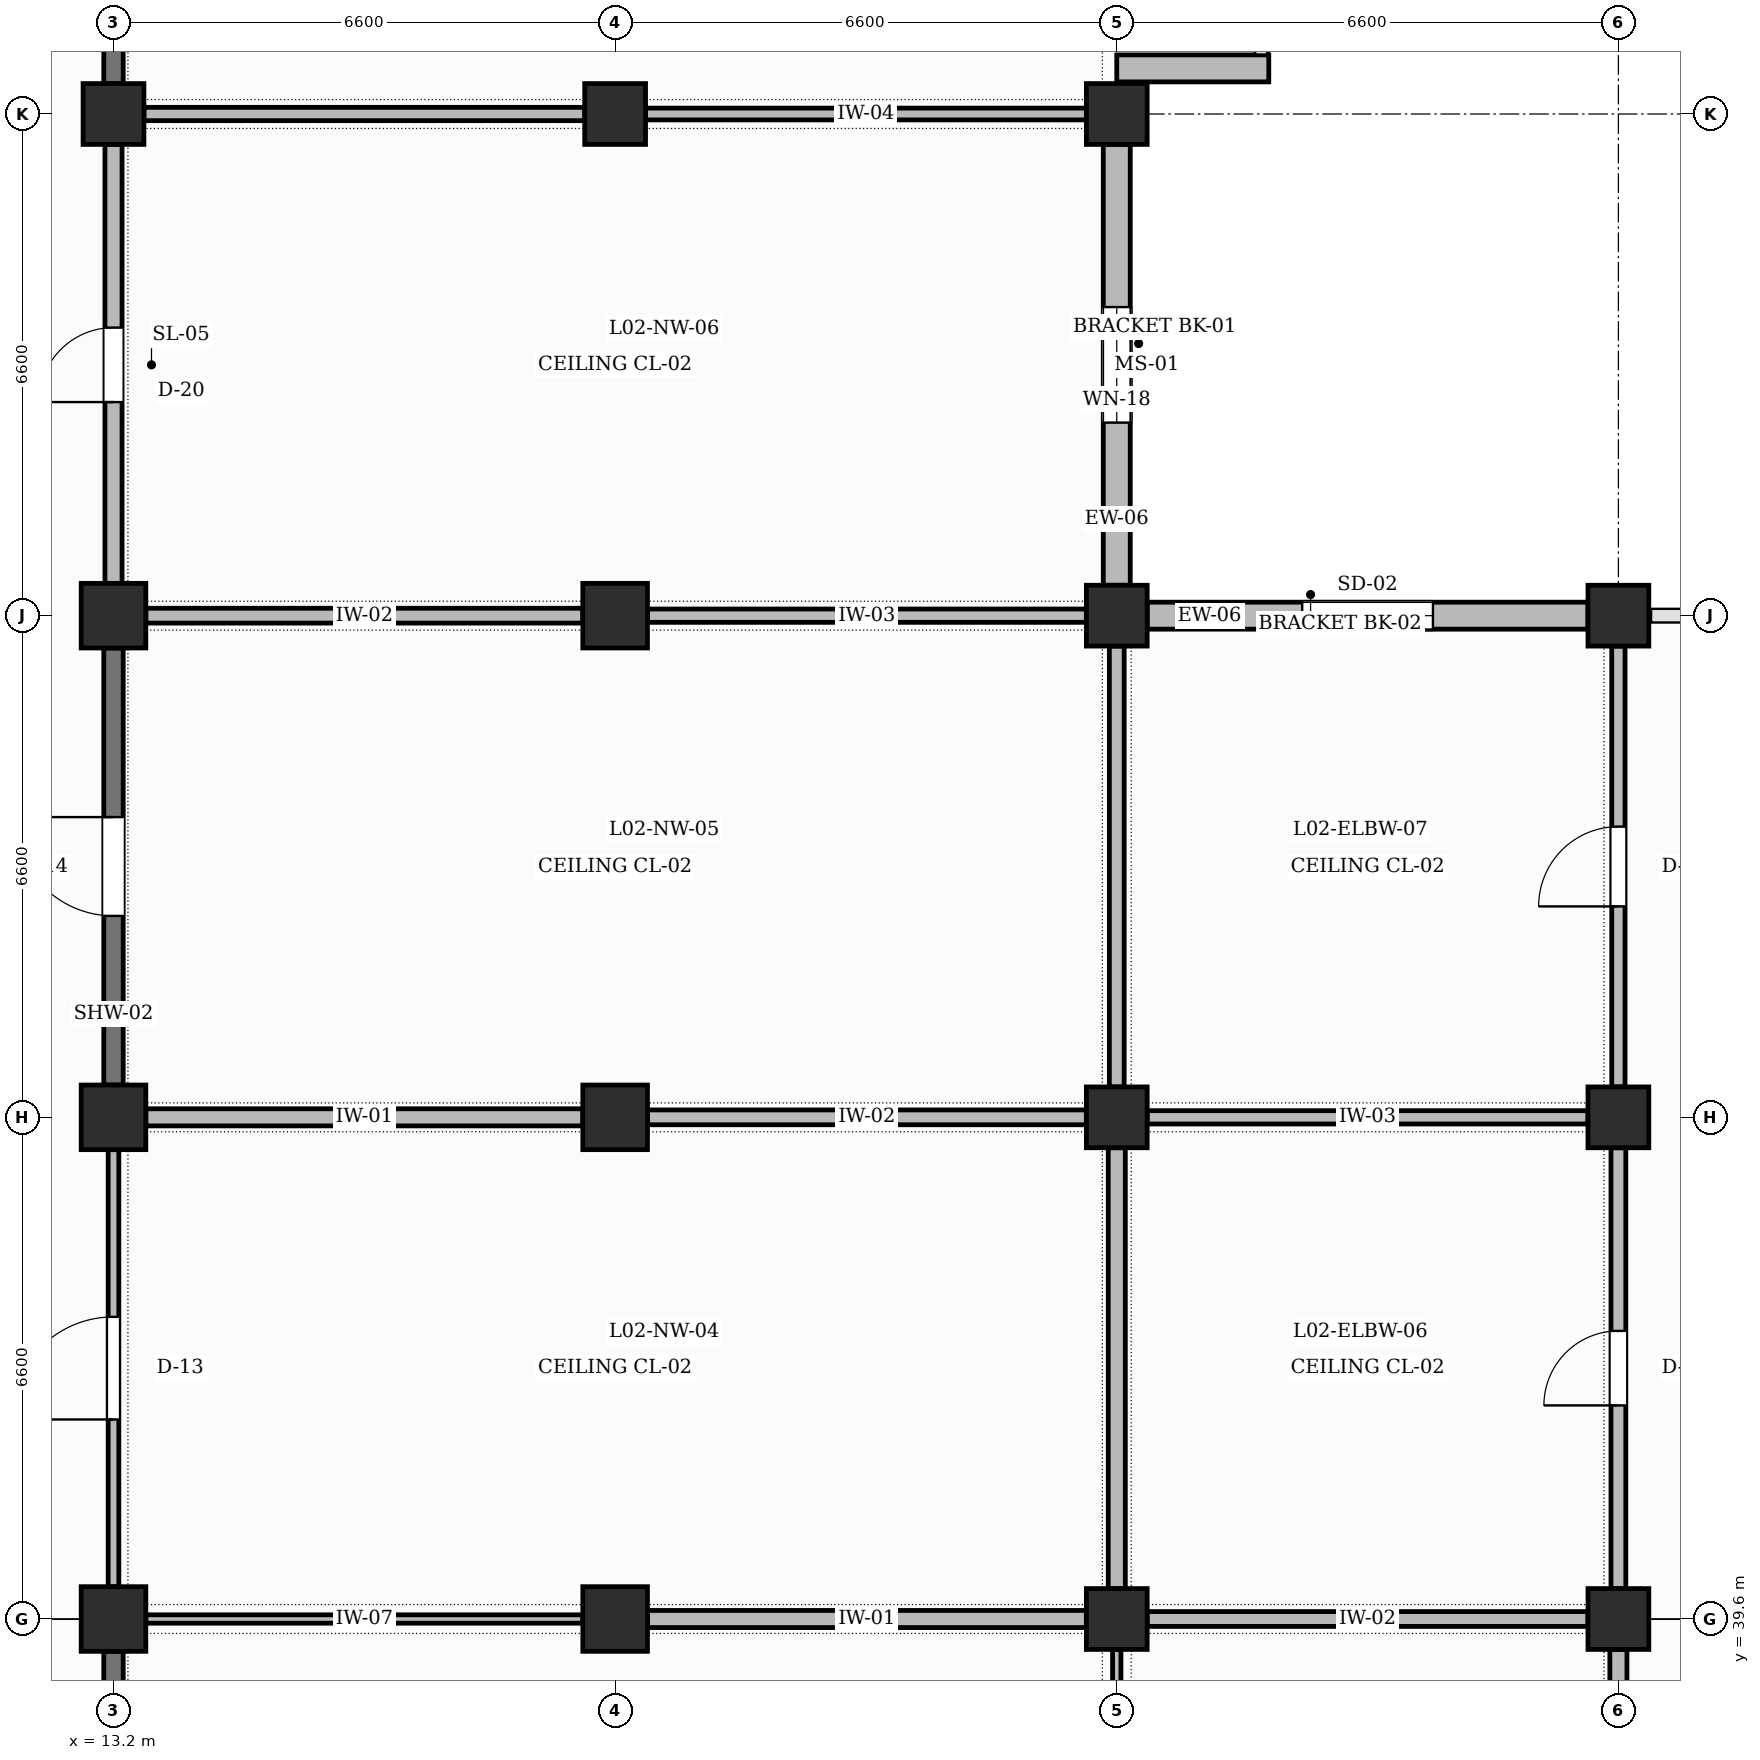
"""IFC4 building model, lengths in metres.
Left out: names, types, materials, properties, quantities, classifications, styles, units other than length and angle.
Written with IfcOpenShell. Run it as: python <this file> out.ifc"""

import sys

from ifc_helpers import new_model, si_unit, direction, frame, frame_2d, origin, origin_2d, place, context, subcontext, project, spatial, rectangle, extrude, element, fill, save


model = new_model("IFC4")
c1 = context("Model", 3, precision=1e-05, world=origin(), true_north=direction((0.0, 1.0)))
c2 = subcontext(c1, "Body", "Model", "MODEL_VIEW")
j1 = project(units=[si_unit("LENGTHUNIT", "METRE"), si_unit("PLANEANGLEUNIT", "RADIAN")], contexts=[c1])
p1 = place(None, origin())
s1 = spatial("IfcSite", under=j1, at=p1, CompositionType="ELEMENT")
p2 = place(p1, origin())
s2 = spatial("IfcBuilding", under=s1, at=p2, CompositionType="ELEMENT")
p3 = place(p2, frame((0.0, 0.0, 10.2)))
s3 = spatial("IfcBuildingStorey", under=s2, at=p3, CompositionType="ELEMENT", Elevation=10.2)
for number, where, z_axis, x_axis in (
    (1, (13.2, 39.6, 0.0), (0.0, 0.0, 1.0), (1.0, 0.0, 0.0)),
    (2, (13.2, 46.2, 0.0), (0.0, 0.0, 1.0), (1.0, 0.0, 0.0)),
    (3, (13.2, 52.8, 0.0), (0.0, 0.0, 1.0), (1.0, 0.0, 0.0)),
):
    element("IfcColumn", number, at=place(p3, frame(where, z_axis=z_axis, x_axis=x_axis)), inside=s3, PredefinedType="COLUMN", context=c2, shape_type="SweptSolid", body=[
        extrude(rectangle(XDim=0.85, YDim=0.85, at=origin_2d()), origin(), (0.0, 0.0, 1.0), 4.2),
    ])
p4 = place(p3, frame((13.2, 59.4, 0.0), z_axis=(0.0, 0.0, 1.0), x_axis=(1.0, 0.0, 0.0)))
e4 = element("IfcColumn", 4, at=p4, inside=s3, PredefinedType="COLUMN", context=c2, shape_type="SweptSolid", body=[
    extrude(rectangle(XDim=0.8, YDim=0.8, at=origin_2d()), origin(), (0.0, 0.0, 1.0), 4.2),
])
for number, where, z_axis, x_axis in (
    (5, (19.8, 39.6, 0.0), (0.0, 0.0, 1.0), (1.0, 0.0, 0.0)),
    (6, (19.8, 46.2, 0.0), (0.0, 0.0, 1.0), (1.0, 0.0, 0.0)),
    (7, (19.8, 52.8, 0.0), (0.0, 0.0, 1.0), (1.0, 0.0, 0.0)),
):
    element("IfcColumn", number, at=place(p3, frame(where, z_axis=z_axis, x_axis=x_axis)), inside=s3, PredefinedType="COLUMN", context=c2, shape_type="SweptSolid", body=[
        extrude(rectangle(XDim=0.85, YDim=0.85, at=origin_2d()), origin(), (0.0, 0.0, 1.0), 4.2),
    ])
for number, where, z_axis, x_axis in (
    (8, (19.8, 59.4, 0.0), (0.0, 0.0, 1.0), (1.0, 0.0, 0.0)),
    (9, (26.4, 39.6, 0.0), (0.0, 0.0, 1.0), (1.0, 0.0, 0.0)),
    (10, (26.4, 46.2, 0.0), (0.0, 0.0, 1.0), (1.0, 0.0, 0.0)),
    (11, (26.4, 52.8, 0.0), (0.0, 0.0, 1.0), (1.0, 0.0, 0.0)),
    (12, (26.4, 59.4, 0.0), (0.0, 0.0, 1.0), (1.0, 0.0, 0.0)),
    (13, (33.0, 39.6, 0.0), (0.0, 0.0, 1.0), (1.0, 0.0, 0.0)),
    (14, (33.0, 46.2, 0.0), (0.0, 0.0, 1.0), (1.0, 0.0, 0.0)),
    (15, (33.0, 52.8, 0.0), (0.0, 0.0, 1.0), (1.0, 0.0, 0.0)),
):
    element("IfcColumn", number, at=place(p3, frame(where, z_axis=z_axis, x_axis=x_axis)), inside=s3, PredefinedType="COLUMN", context=c2, shape_type="SweptSolid", body=[
        extrude(rectangle(XDim=0.8, YDim=0.8, at=origin_2d()), origin(), (0.0, 0.0, 1.0), 4.2),
    ])
p5 = place(p3, frame((26.4, 53.2, 0.0), z_axis=(0.0, 0.0, 1.0), x_axis=(0.0, 1.0, 0.0)))
e16 = element("IfcWall", 16, at=p5, inside=s3, PredefinedType="SOLIDWALL", context=c2, shape_type="SweptSolid", body=[
    extrude(rectangle(XDim=5.8, YDim=0.355, at=frame_2d((2.9, 0.0))), origin(), (0.0, 0.0, 1.0), 3.25),
])
p6 = place(p5, frame((2.14, 0.0, 0.95)))
e17 = element("IfcOpeningElement", 17, at=p6, cuts=e16, PredefinedType="OPENING", context=c2, shape_type="SweptSolid", body=[
    extrude(rectangle(XDim=1.52, YDim=1.52, at=frame_2d((0.76, 0.76))), frame((0.0, 0.188, 0.0), z_axis=(0.0, -1.0, 0.0), x_axis=(1.0, 0.0, 0.0)), (0.0, 0.0, 1.0), 0.375),
])
p7 = place(p3, frame((26.4, 60.0, 0.0), z_axis=(0.0, 0.0, 1.0), x_axis=(1.0, 0.0, 0.0)))
e18 = element("IfcWall", 18, at=p7, inside=s3, PredefinedType="SOLIDWALL", context=c2, shape_type="SweptSolid", body=[
    extrude(rectangle(XDim=2.0, YDim=0.355, at=frame_2d((1.0, 0.0))), origin(), (0.0, 0.0, 1.0), 3.25),
])
p8 = place(p3, frame((26.8, 52.8, 0.0), z_axis=(0.0, 0.0, 1.0), x_axis=(1.0, 0.0, 0.0)))
e19 = element("IfcWall", 19, at=p8, inside=s3, PredefinedType="SOLIDWALL", context=c2, shape_type="SweptSolid", body=[
    extrude(rectangle(XDim=5.8, YDim=0.355, at=frame_2d((2.9, 0.0))), origin(), (0.0, 0.0, 1.0), 3.25),
])
p9 = place(p8, frame((2.04, 0.0, 0.95)))
e20 = element("IfcOpeningElement", 20, at=p9, cuts=e19, PredefinedType="OPENING", context=c2, shape_type="SweptSolid", body=[
    extrude(rectangle(XDim=1.72, YDim=1.3, at=frame_2d((0.86, 0.65))), frame((0.0, 0.188, 0.0), z_axis=(0.0, -1.0, 0.0), x_axis=(1.0, 0.0, 0.0)), (0.0, 0.0, 1.0), 0.375),
])
p10 = place(p3, frame((13.2, 33.425, 0.0), z_axis=(0.0, 0.0, 1.0), x_axis=(0.0, 1.0, 0.0)))
e21 = element("IfcWall", 21, at=p10, inside=s3, PredefinedType="SHEAR", context=c2, shape_type="SweptSolid", body=[
    extrude(rectangle(XDim=5.75, YDim=0.255, at=frame_2d((2.875, 0.0))), origin(), (0.0, 0.0, 1.0), 3.1),
])
p11 = place(p10, frame((2.335, 0.0, 0.0)))
e22 = element("IfcOpeningElement", 22, at=p11, cuts=e21, PredefinedType="OPENING", context=c2, shape_type="SweptSolid", body=[
    extrude(rectangle(XDim=1.08, YDim=2.15, at=frame_2d((0.54, 1.075))), frame((0.0, 0.137, 0.0), z_axis=(0.0, -1.0, 0.0), x_axis=(1.0, 0.0, 0.0)), (0.0, 0.0, 1.0), 0.275),
])
p12 = place(p3, frame((13.2, 40.025, 0.0), z_axis=(0.0, 0.0, 1.0), x_axis=(0.0, 1.0, 0.0)))
e23 = element("IfcWall", 23, at=p12, inside=s3, PredefinedType="PARTITIONING", context=c2, shape_type="SweptSolid", body=[
    extrude(rectangle(XDim=5.75, YDim=0.14, at=frame_2d((2.875, 0.0))), origin(), (0.0, 0.0, 1.0), 3.1),
])
p13 = place(p12, frame((2.2, 0.0, 0.0)))
e24 = element("IfcOpeningElement", 24, at=p13, cuts=e23, PredefinedType="OPENING", context=c2, shape_type="SweptSolid", body=[
    extrude(rectangle(XDim=1.35, YDim=2.3, at=frame_2d((0.675, 1.15))), frame((0.0, 0.08, 0.0), z_axis=(0.0, -1.0, 0.0), x_axis=(1.0, 0.0, 0.0)), (0.0, 0.0, 1.0), 0.16),
])
p14 = place(p3, frame((13.2, 46.625, 0.0), z_axis=(0.0, 0.0, 1.0), x_axis=(0.0, 1.0, 0.0)))
e25 = element("IfcWall", 25, at=p14, inside=s3, PredefinedType="SHEAR", context=c2, shape_type="SweptSolid", body=[
    extrude(rectangle(XDim=5.75, YDim=0.255, at=frame_2d((2.875, 0.0))), origin(), (0.0, 0.0, 1.0), 3.1),
])
p15 = place(p14, frame((2.225, 0.0, 0.0)))
e26 = element("IfcOpeningElement", 26, at=p15, cuts=e25, PredefinedType="OPENING", context=c2, shape_type="SweptSolid", body=[
    extrude(rectangle(XDim=1.3, YDim=2.3, at=frame_2d((0.65, 1.15))), frame((0.0, 0.137, 0.0), z_axis=(0.0, -1.0, 0.0), x_axis=(1.0, 0.0, 0.0)), (0.0, 0.0, 1.0), 0.275),
])
p16 = place(p3, frame((13.2, 53.225, 0.0), z_axis=(0.0, 0.0, 1.0), x_axis=(0.0, 1.0, 0.0)))
e27 = element("IfcWall", 27, at=p16, inside=s3, PredefinedType="PARTITIONING", context=c2, shape_type="SweptSolid", body=[
    extrude(rectangle(XDim=5.775, YDim=0.225, at=frame_2d((2.887, 0.0))), origin(), (0.0, 0.0, 1.0), 3.1),
])
p17 = place(p16, frame((2.385, 0.0, 0.0)))
e28 = element("IfcOpeningElement", 28, at=p17, cuts=e27, PredefinedType="OPENING", context=c2, shape_type="SweptSolid", body=[
    extrude(rectangle(XDim=0.98, YDim=2.15, at=frame_2d((0.49, 1.075))), frame((0.0, 0.123, 0.0), z_axis=(0.0, -1.0, 0.0), x_axis=(1.0, 0.0, 0.0)), (0.0, 0.0, 1.0), 0.245),
])
p18 = place(p3, frame((13.2, 59.8, 0.0), z_axis=(0.0, 0.0, 1.0), x_axis=(0.0, 1.0, 0.0)))
e29 = element("IfcWall", 29, at=p18, inside=s3, PredefinedType="SHEAR", context=c2, shape_type="SweptSolid", body=[
    extrude(rectangle(XDim=5.8, YDim=0.255, at=frame_2d((2.9, 0.0))), origin(), (0.0, 0.0, 1.0), 3.1),
])
p19 = place(p18, frame((2.175, 0.0, 0.0)))
e30 = element("IfcOpeningElement", 30, at=p19, cuts=e29, PredefinedType="OPENING", context=c2, shape_type="SweptSolid", body=[
    extrude(rectangle(XDim=1.45, YDim=2.25, at=frame_2d((0.725, 1.125))), frame((0.0, 0.137, 0.0), z_axis=(0.0, -1.0, 0.0), x_axis=(1.0, 0.0, 0.0)), (0.0, 0.0, 1.0), 0.275),
])
p20 = place(p3, frame((13.625, 39.6, 0.0), z_axis=(0.0, 0.0, 1.0), x_axis=(1.0, 0.0, 0.0)))
e31 = element("IfcWall", 31, at=p20, inside=s3, PredefinedType="PARTITIONING", context=c2, shape_type="SweptSolid", body=[
    extrude(rectangle(XDim=5.75, YDim=0.11, at=frame_2d((2.875, 0.0))), origin(), (0.0, 0.0, 1.0), 3.0),
])
p21 = place(p3, frame((13.625, 46.2, 0.0), z_axis=(0.0, 0.0, 1.0), x_axis=(1.0, 0.0, 0.0)))
e32 = element("IfcWall", 32, at=p21, inside=s3, PredefinedType="PARTITIONING", context=c2, shape_type="SweptSolid", body=[
    extrude(rectangle(XDim=5.75, YDim=0.225, at=frame_2d((2.875, 0.0))), origin(), (0.0, 0.0, 1.0), 3.1),
])
p22 = place(p3, frame((13.625, 52.8, 0.0), z_axis=(0.0, 0.0, 1.0), x_axis=(1.0, 0.0, 0.0)))
e33 = element("IfcWall", 33, at=p22, inside=s3, PredefinedType="PARTITIONING", context=c2, shape_type="SweptSolid", body=[
    extrude(rectangle(XDim=5.75, YDim=0.195, at=frame_2d((2.875, 0.0))), origin(), (0.0, 0.0, 1.0), 3.0),
])
p23 = place(p3, frame((13.6, 59.4, 0.0), z_axis=(0.0, 0.0, 1.0), x_axis=(1.0, 0.0, 0.0)))
e34 = element("IfcWall", 34, at=p23, inside=s3, PredefinedType="PARTITIONING", context=c2, shape_type="SweptSolid", body=[
    extrude(rectangle(XDim=5.8, YDim=0.175, at=frame_2d((2.9, 0.0))), origin(), (0.0, 0.0, 1.0), 3.1),
])
p24 = place(p3, frame((26.4, 33.4, 0.0), z_axis=(0.0, 0.0, 1.0), x_axis=(0.0, 1.0, 0.0)))
e35 = element("IfcWall", 35, at=p24, inside=s3, PredefinedType="PARTITIONING", context=c2, shape_type="SweptSolid", body=[
    extrude(rectangle(XDim=5.8, YDim=0.11, at=frame_2d((2.9, 0.0))), origin(), (0.0, 0.0, 1.0), 3.1),
])
p25 = place(p3, frame((20.225, 39.6, 0.0), z_axis=(0.0, 0.0, 1.0), x_axis=(1.0, 0.0, 0.0)))
e36 = element("IfcWall", 36, at=p25, inside=s3, PredefinedType="PARTITIONING", context=c2, shape_type="SweptSolid", body=[
    extrude(rectangle(XDim=5.775, YDim=0.225, at=frame_2d((2.887, 0.0))), origin(), (0.0, 0.0, 1.0), 3.1),
])
p26 = place(p3, frame((26.4, 40.0, 0.0), z_axis=(0.0, 0.0, 1.0), x_axis=(0.0, 1.0, 0.0)))
e37 = element("IfcWall", 37, at=p26, inside=s3, PredefinedType="PARTITIONING", context=c2, shape_type="SweptSolid", body=[
    extrude(rectangle(XDim=5.8, YDim=0.225, at=frame_2d((2.9, 0.0))), origin(), (0.0, 0.0, 1.0), 3.1),
])
p27 = place(p3, frame((20.225, 46.2, 0.0), z_axis=(0.0, 0.0, 1.0), x_axis=(1.0, 0.0, 0.0)))
e38 = element("IfcWall", 38, at=p27, inside=s3, PredefinedType="PARTITIONING", context=c2, shape_type="SweptSolid", body=[
    extrude(rectangle(XDim=5.775, YDim=0.195, at=frame_2d((2.887, 0.0))), origin(), (0.0, 0.0, 1.0), 3.0),
])
p28 = place(p3, frame((26.4, 46.6, 0.0), z_axis=(0.0, 0.0, 1.0), x_axis=(0.0, 1.0, 0.0)))
e39 = element("IfcWall", 39, at=p28, inside=s3, PredefinedType="PARTITIONING", context=c2, shape_type="SweptSolid", body=[
    extrude(rectangle(XDim=5.8, YDim=0.195, at=frame_2d((2.9, 0.0))), origin(), (0.0, 0.0, 1.0), 3.1),
])
p29 = place(p3, frame((20.225, 52.8, 0.0), z_axis=(0.0, 0.0, 1.0), x_axis=(1.0, 0.0, 0.0)))
e40 = element("IfcWall", 40, at=p29, inside=s3, PredefinedType="PARTITIONING", context=c2, shape_type="SweptSolid", body=[
    extrude(rectangle(XDim=5.775, YDim=0.175, at=frame_2d((2.887, 0.0))), origin(), (0.0, 0.0, 1.0), 3.1),
])
p30 = place(p3, frame((20.2, 59.4, 0.0), z_axis=(0.0, 0.0, 1.0), x_axis=(1.0, 0.0, 0.0)))
e41 = element("IfcWall", 41, at=p30, inside=s3, PredefinedType="PARTITIONING", context=c2, shape_type="SweptSolid", body=[
    extrude(rectangle(XDim=5.8, YDim=0.155, at=frame_2d((2.9, 0.0))), origin(), (0.0, 0.0, 1.0), 3.4),
])
p31 = place(p3, frame((33.0, 33.4, 0.0), z_axis=(0.0, 0.0, 1.0), x_axis=(0.0, 1.0, 0.0)))
e42 = element("IfcWall", 42, at=p31, inside=s3, PredefinedType="PARTITIONING", context=c2, shape_type="SweptSolid", body=[
    extrude(rectangle(XDim=5.8, YDim=0.225, at=frame_2d((2.9, 0.0))), origin(), (0.0, 0.0, 1.0), 3.1),
])
p32 = place(p31, frame((2.31, 0.0, 0.0)))
e43 = element("IfcOpeningElement", 43, at=p32, cuts=e42, PredefinedType="OPENING", context=c2, shape_type="SweptSolid", body=[
    extrude(rectangle(XDim=1.18, YDim=2.2, at=frame_2d((0.59, 1.1))), frame((0.0, 0.123, 0.0), z_axis=(0.0, -1.0, 0.0), x_axis=(1.0, 0.0, 0.0)), (0.0, 0.0, 1.0), 0.245),
])
p33 = place(p3, frame((26.8, 39.6, 0.0), z_axis=(0.0, 0.0, 1.0), x_axis=(1.0, 0.0, 0.0)))
e44 = element("IfcWall", 44, at=p33, inside=s3, PredefinedType="PARTITIONING", context=c2, shape_type="SweptSolid", body=[
    extrude(rectangle(XDim=5.8, YDim=0.195, at=frame_2d((2.9, 0.0))), origin(), (0.0, 0.0, 1.0), 3.0),
])
p34 = place(p3, frame((33.0, 40.0, 0.0), z_axis=(0.0, 0.0, 1.0), x_axis=(0.0, 1.0, 0.0)))
e45 = element("IfcWall", 45, at=p34, inside=s3, PredefinedType="PARTITIONING", context=c2, shape_type="SweptSolid", body=[
    extrude(rectangle(XDim=5.8, YDim=0.195, at=frame_2d((2.9, 0.0))), origin(), (0.0, 0.0, 1.0), 3.1),
])
p35 = place(p34, frame((2.41, 0.0, 0.0)))
e46 = element("IfcOpeningElement", 46, at=p35, cuts=e45, PredefinedType="OPENING", context=c2, shape_type="SweptSolid", body=[
    extrude(rectangle(XDim=0.98, YDim=2.15, at=frame_2d((0.49, 1.075))), frame((0.0, 0.107, 0.0), z_axis=(0.0, -1.0, 0.0), x_axis=(1.0, 0.0, 0.0)), (0.0, 0.0, 1.0), 0.215),
])
p36 = place(p3, frame((26.8, 46.2, 0.0), z_axis=(0.0, 0.0, 1.0), x_axis=(1.0, 0.0, 0.0)))
e47 = element("IfcWall", 47, at=p36, inside=s3, PredefinedType="PARTITIONING", context=c2, shape_type="SweptSolid", body=[
    extrude(rectangle(XDim=5.8, YDim=0.175, at=frame_2d((2.9, 0.0))), origin(), (0.0, 0.0, 1.0), 3.1),
])
p37 = place(p3, frame((33.0, 46.6, 0.0), z_axis=(0.0, 0.0, 1.0), x_axis=(0.0, 1.0, 0.0)))
e48 = element("IfcWall", 48, at=p37, inside=s3, PredefinedType="PARTITIONING", context=c2, shape_type="SweptSolid", body=[
    extrude(rectangle(XDim=5.8, YDim=0.175, at=frame_2d((2.9, 0.0))), origin(), (0.0, 0.0, 1.0), 3.1),
])
p38 = place(p37, frame((2.375, 0.0, 0.0)))
e49 = element("IfcOpeningElement", 49, at=p38, cuts=e48, PredefinedType="OPENING", context=c2, shape_type="SweptSolid", body=[
    extrude(rectangle(XDim=1.05, YDim=2.15, at=frame_2d((0.525, 1.075))), frame((0.0, 0.097, 0.0), z_axis=(0.0, -1.0, 0.0), x_axis=(1.0, 0.0, 0.0)), (0.0, 0.0, 1.0), 0.195),
])
p39 = place(p6, origin())
e50 = element("IfcWindow", 50, at=p39, inside=s3, PartitioningType="DOUBLE_PANEL_VERTICAL", PredefinedType="WINDOW", context=c2, shape_type="SweptSolid", body=[
    extrude(rectangle(XDim=1.52, YDim=1.52, at=frame_2d((0.76, 0.76))), frame((0.0, 0.03, 0.0), z_axis=(0.0, -1.0, 0.0), x_axis=(1.0, 0.0, 0.0)), (0.0, 0.0, 1.0), 0.06),
])
fill(e17, e50)
p40 = place(p9, origin())
e51 = element("IfcWindow", 51, at=p40, inside=s3, PartitioningType="DOUBLE_PANEL_VERTICAL", PredefinedType="WINDOW", context=c2, shape_type="SweptSolid", body=[
    extrude(rectangle(XDim=1.72, YDim=1.3, at=frame_2d((0.86, 0.65))), frame((0.0, 0.03, 0.0), z_axis=(0.0, -1.0, 0.0), x_axis=(1.0, 0.0, 0.0)), (0.0, 0.0, 1.0), 0.06),
])
fill(e20, e51)
p41 = place(p35, origin())
e52 = element("IfcDoor", 52, at=p41, inside=s3, OperationType="SINGLE_SWING_LEFT", PredefinedType="DOOR", context=c2, shape_type="SweptSolid", body=[
    extrude(rectangle(XDim=0.98, YDim=2.15, at=frame_2d((0.49, 1.075))), frame((0.0, 0.025, 0.0), z_axis=(0.0, -1.0, 0.0), x_axis=(1.0, 0.0, 0.0)), (0.0, 0.0, 1.0), 0.05),
])
fill(e46, e52)
p42 = place(p38, origin())
e53 = element("IfcDoor", 53, at=p42, inside=s3, OperationType="SINGLE_SWING_LEFT", PredefinedType="DOOR", context=c2, shape_type="SweptSolid", body=[
    extrude(rectangle(XDim=1.05, YDim=2.15, at=frame_2d((0.525, 1.075))), frame((0.0, 0.025, 0.0), z_axis=(0.0, -1.0, 0.0), x_axis=(1.0, 0.0, 0.0)), (0.0, 0.0, 1.0), 0.05),
])
fill(e49, e53)
p43 = place(p13, origin())
e54 = element("IfcDoor", 54, at=p43, inside=s3, OperationType="SINGLE_SWING_LEFT", PredefinedType="DOOR", context=c2, shape_type="SweptSolid", body=[
    extrude(rectangle(XDim=1.35, YDim=2.3, at=frame_2d((0.675, 1.15))), frame((0.0, 0.025, 0.0), z_axis=(0.0, -1.0, 0.0), x_axis=(1.0, 0.0, 0.0)), (0.0, 0.0, 1.0), 0.05),
])
fill(e24, e54)
p44 = place(p15, origin())
e55 = element("IfcDoor", 55, at=p44, inside=s3, OperationType="SINGLE_SWING_RIGHT", PredefinedType="DOOR", context=c2, shape_type="SweptSolid", body=[
    extrude(rectangle(XDim=1.3, YDim=2.3, at=frame_2d((0.65, 1.15))), frame((0.0, 0.025, 0.0), z_axis=(0.0, -1.0, 0.0), x_axis=(1.0, 0.0, 0.0)), (0.0, 0.0, 1.0), 0.05),
])
fill(e26, e55)
p45 = place(p17, origin())
e56 = element("IfcDoor", 56, at=p45, inside=s3, OperationType="SINGLE_SWING_LEFT", PredefinedType="DOOR", context=c2, shape_type="SweptSolid", body=[
    extrude(rectangle(XDim=0.98, YDim=2.15, at=frame_2d((0.49, 1.075))), frame((0.0, 0.025, 0.0), z_axis=(0.0, -1.0, 0.0), x_axis=(1.0, 0.0, 0.0)), (0.0, 0.0, 1.0), 0.05),
])
fill(e28, e56)
save(model, sys.argv[1])
